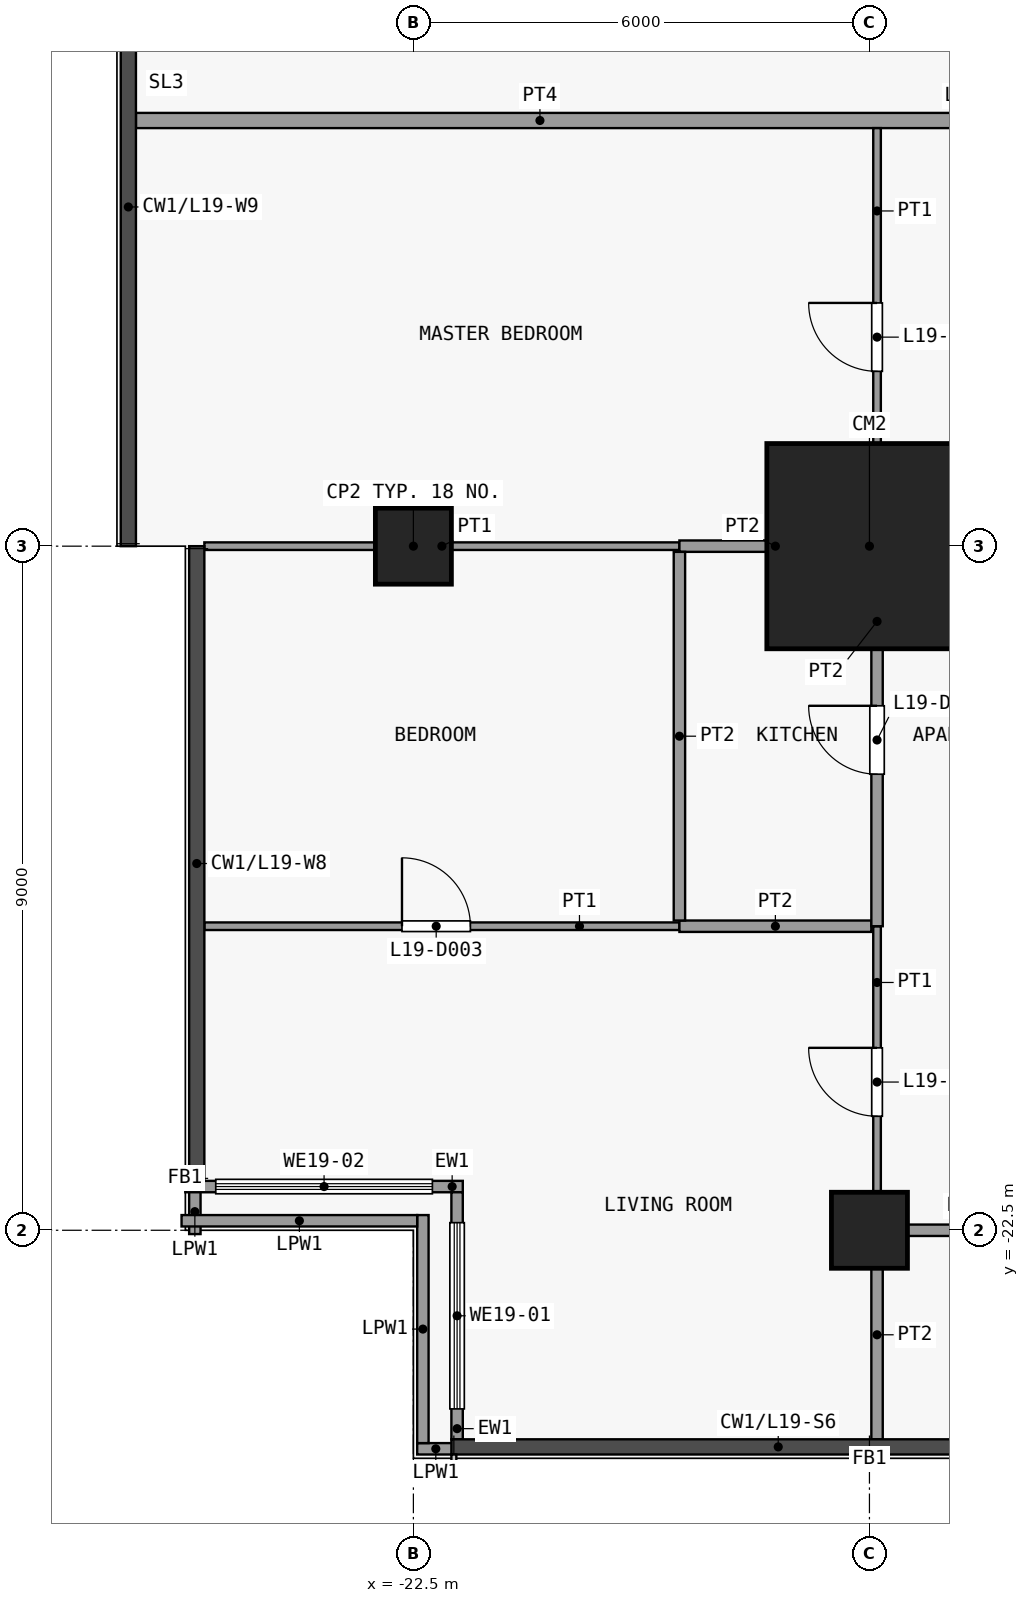
"""IFC4 building model, lengths in metres.
Left out: names, types, materials, properties, quantities, classifications, styles, units other than length and angle.
Written with IfcOpenShell. Run it as: python <this file> out.ifc"""

import sys

from ifc_helpers import new_model, si_unit, direction, frame, frame_2d, origin, origin_2d, place, context, subcontext, project, spatial, rectangle, extrude, element, fill, save


model = new_model("IFC4")
c1 = context("Model", 3, precision=1e-05, world=origin(), true_north=direction((0.0, 1.0)))
c2 = subcontext(c1, "Body", "Model", "MODEL_VIEW")
j1 = project(units=[si_unit("LENGTHUNIT", "METRE"), si_unit("PLANEANGLEUNIT", "RADIAN")], contexts=[c1])
p1 = place(None, origin())
s1 = spatial("IfcSite", under=j1, at=p1, CompositionType="ELEMENT")
p2 = place(p1, origin())
s2 = spatial("IfcBuilding", under=s1, at=p2, CompositionType="ELEMENT")
p3 = place(p2, frame((0.0, 0.0, 81.1)))
s3 = spatial("IfcBuildingStorey", under=s2, at=p3, CompositionType="ELEMENT", Elevation=81.1)
for number, where, z_axis, x_axis in (
    (1, (-22.5, -13.5, 0.0), (0.0, 0.0, 1.0), (1.0, 0.0, 0.0)),
    (2, (-16.5, -22.5, 0.0), (0.0, 0.0, 1.0), (1.0, 0.0, 0.0)),
):
    element("IfcColumn", number, at=place(p3, frame(where, z_axis=z_axis, x_axis=x_axis)), inside=s3, PredefinedType="COLUMN", context=c2, shape_type="SweptSolid", body=[
        extrude(rectangle(XDim=1.0, YDim=1.0, at=origin_2d()), origin(), (0.0, 0.0, 1.0), 3.6),
    ])
p4 = place(p3, frame((-16.5, -13.5, 0.0), z_axis=(0.0, 0.0, 1.0), x_axis=(1.0, 0.0, 0.0)))
e3 = element("IfcColumn", 3, at=p4, inside=s3, PredefinedType="COLUMN", context=c2, shape_type="SweptSolid", body=[
    extrude(rectangle(XDim=2.7, YDim=2.7, at=origin_2d()), origin(), (0.0, 0.0, 1.0), 3.6),
])
p5 = place(p3, frame((-21.925, -25.25, 0.0), z_axis=(0.0, 0.0, 1.0), x_axis=(0.0, 1.0, 0.0)))
e4 = element("IfcWall", 4, at=p5, inside=s3, PredefinedType="SOLIDWALL", context=c2, shape_type="SweptSolid", body=[
    extrude(rectangle(XDim=3.25, YDim=0.15, at=frame_2d((1.625, 0.0))), origin(), (0.0, 0.0, 1.0), 3.3),
])
p6 = place(p5, frame((0.4, 0.0, 0.9)))
e5 = element("IfcOpeningElement", 5, at=p6, cuts=e4, PredefinedType="OPENING", context=c2, shape_type="SweptSolid", body=[
    extrude(rectangle(XDim=2.45, YDim=2.4, at=frame_2d((1.225, 1.2))), frame((0.0, 0.085, 0.0), z_axis=(0.0, -1.0, 0.0), x_axis=(1.0, 0.0, 0.0)), (0.0, 0.0, 1.0), 0.17),
])
p7 = place(p3, frame((-21.85, -21.925, 0.0), z_axis=(0.0, 0.0, 1.0), x_axis=(-1.0, 0.0, 0.0)))
e6 = element("IfcWall", 6, at=p7, inside=s3, PredefinedType="SOLIDWALL", context=c2, shape_type="SweptSolid", body=[
    extrude(rectangle(XDim=3.65, YDim=0.15, at=frame_2d((1.825, 0.0))), origin(), (0.0, 0.0, 1.0), 3.3),
])
p8 = place(p7, frame((0.4, 0.0, 0.9)))
e7 = element("IfcOpeningElement", 7, at=p8, cuts=e6, PredefinedType="OPENING", context=c2, shape_type="SweptSolid", body=[
    extrude(rectangle(XDim=2.85, YDim=2.4, at=frame_2d((1.425, 1.2))), frame((0.0, 0.085, 0.0), z_axis=(0.0, -1.0, 0.0), x_axis=(1.0, 0.0, 0.0)), (0.0, 0.0, 1.0), 0.17),
])
p9 = place(p3, frame((-25.375, -22.55, 0.0), z_axis=(0.0, 0.0, 1.0), x_axis=(0.0, 1.0, 0.0)))
e8 = element("IfcWall", 8, at=p9, inside=s3, PredefinedType="PARAPET", context=c2, shape_type="SweptSolid", body=[
    extrude(rectangle(XDim=0.59, YDim=0.15, at=frame_2d((0.295, 0.0))), origin(), (0.0, 0.0, 1.0), 1.15),
])
p10 = place(p3, frame((-21.96, -25.375, 0.0), z_axis=(0.0, 0.0, 1.0), x_axis=(-1.0, 0.0, 0.0)))
e9 = element("IfcWall", 9, at=p10, inside=s3, PredefinedType="PARAPET", context=c2, shape_type="SweptSolid", body=[
    extrude(rectangle(XDim=0.49, YDim=0.15, at=frame_2d((0.245, 0.0))), origin(), (0.0, 0.0, 1.0), 1.15),
])
p11 = place(p3, frame((-22.375, -25.3, 0.0), z_axis=(0.0, 0.0, 1.0), x_axis=(0.0, 1.0, 0.0)))
e10 = element("IfcWall", 10, at=p11, inside=s3, PredefinedType="PARAPET", context=c2, shape_type="SweptSolid", body=[
    extrude(rectangle(XDim=3.0, YDim=0.15, at=frame_2d((1.5, 0.0))), origin(), (0.0, 0.0, 1.0), 1.15),
])
p12 = place(p3, frame((-22.45, -22.375, 0.0), z_axis=(0.0, 0.0, 1.0), x_axis=(-1.0, 0.0, 0.0)))
e11 = element("IfcWall", 11, at=p12, inside=s3, PredefinedType="PARAPET", context=c2, shape_type="SweptSolid", body=[
    extrude(rectangle(XDim=3.1, YDim=0.15, at=frame_2d((1.55, 0.0))), origin(), (0.0, 0.0, 1.0), 1.15),
])
p13 = place(p3, frame((-16.325, -22.5, 0.0), z_axis=(0.0, 0.0, 1.0), x_axis=(1.0, 0.0, 0.0)))
e12 = element("IfcWall", 12, at=p13, inside=s3, PredefinedType="PARTITIONING", context=c2, shape_type="SweptSolid", body=[
    extrude(rectangle(XDim=2.925, YDim=0.15, at=frame_2d((1.462, 0.0))), origin(), (0.0, 0.0, 1.0), 3.3),
])
p14 = place(p13, frame((1.0, 0.0, 0.0)))
e13 = element("IfcOpeningElement", 13, at=p14, cuts=e12, PredefinedType="OPENING", context=c2, shape_type="SweptSolid", body=[
    extrude(rectangle(XDim=0.9, YDim=2.1, at=frame_2d((0.45, 1.05))), frame((0.0, 0.085, 0.0), z_axis=(0.0, -1.0, 0.0), x_axis=(1.0, 0.0, 0.0)), (0.0, 0.0, 1.0), 0.17),
])
p15 = place(p3, frame((-25.25, -18.5, 0.0), z_axis=(0.0, 0.0, 1.0), x_axis=(1.0, 0.0, 0.0)))
e14 = element("IfcWall", 14, at=p15, inside=s3, PredefinedType="PARTITIONING", context=c2, shape_type="SweptSolid", body=[
    extrude(rectangle(XDim=6.25, YDim=0.1, at=frame_2d((3.125, 0.0))), origin(), (0.0, 0.0, 1.0), 3.3),
])
p16 = place(p15, frame((2.6, 0.0, 0.0)))
e15 = element("IfcOpeningElement", 15, at=p16, cuts=e14, PredefinedType="OPENING", context=c2, shape_type="SweptSolid", body=[
    extrude(rectangle(XDim=0.9, YDim=2.1, at=frame_2d((0.45, 1.05))), frame((0.0, 0.06, 0.0), z_axis=(0.0, -1.0, 0.0), x_axis=(1.0, 0.0, 0.0)), (0.0, 0.0, 1.0), 0.12),
])
p17 = place(p3, frame((-19.0, -18.5, 0.0), z_axis=(0.0, 0.0, 1.0), x_axis=(1.0, 0.0, 0.0)))
e16 = element("IfcWall", 16, at=p17, inside=s3, PredefinedType="PARTITIONING", context=c2, shape_type="SweptSolid", body=[
    extrude(rectangle(XDim=2.525, YDim=0.15, at=frame_2d((1.262, 0.0))), origin(), (0.0, 0.0, 1.0), 3.3),
])
p18 = place(p3, frame((-25.25, -13.5, 0.0), z_axis=(0.0, 0.0, 1.0), x_axis=(1.0, 0.0, 0.0)))
e17 = element("IfcWall", 17, at=p18, inside=s3, PredefinedType="PARTITIONING", context=c2, shape_type="SweptSolid", body=[
    extrude(rectangle(XDim=6.25, YDim=0.1, at=frame_2d((3.125, 0.0))), origin(), (0.0, 0.0, 1.0), 3.3),
])
p19 = place(p3, frame((-19.0, -13.5, 0.0), z_axis=(0.0, 0.0, 1.0), x_axis=(1.0, 0.0, 0.0)))
e18 = element("IfcWall", 18, at=p19, inside=s3, PredefinedType="PARTITIONING", context=c2, shape_type="SweptSolid", body=[
    extrude(rectangle(XDim=2.525, YDim=0.15, at=frame_2d((1.262, 0.0))), origin(), (0.0, 0.0, 1.0), 3.3),
])
p20 = place(p3, frame((-26.15, -7.9, 0.0), z_axis=(0.0, 0.0, 1.0), x_axis=(1.0, 0.0, 0.0)))
e19 = element("IfcWall", 19, at=p20, inside=s3, PredefinedType="PARTITIONING", context=c2, shape_type="SweptSolid", body=[
    extrude(rectangle(XDim=12.75, YDim=0.2, at=frame_2d((6.375, 0.0))), origin(), (0.0, 0.0, 1.0), 3.3),
])
p21 = place(p20, frame((10.75, 0.0, 0.0)))
e20 = element("IfcOpeningElement", 20, at=p21, cuts=e19, PredefinedType="OPENING", context=c2, shape_type="SweptSolid", body=[
    extrude(rectangle(XDim=1.0, YDim=2.1, at=frame_2d((0.5, 1.05))), frame((0.0, 0.11, 0.0), z_axis=(0.0, -1.0, 0.0), x_axis=(1.0, 0.0, 0.0)), (0.0, 0.0, 1.0), 0.22),
])
p22 = place(p3, frame((-19.0, -18.425, 0.0), z_axis=(0.0, 0.0, 1.0), x_axis=(0.0, 1.0, 0.0)))
e21 = element("IfcWall", 21, at=p22, inside=s3, PredefinedType="PARTITIONING", context=c2, shape_type="SweptSolid", body=[
    extrude(rectangle(XDim=4.85, YDim=0.15, at=frame_2d((2.425, 0.0))), origin(), (0.0, 0.0, 1.0), 3.3),
])
p23 = place(p3, frame((-16.4, -22.5, 0.0), z_axis=(0.0, 0.0, 1.0), x_axis=(0.0, 1.0, 0.0)))
e22 = element("IfcWall", 22, at=p23, inside=s3, PredefinedType="PARTITIONING", context=c2, shape_type="SweptSolid", body=[
    extrude(rectangle(XDim=4.0, YDim=0.1, at=frame_2d((2.0, 0.0))), origin(), (0.0, 0.0, 1.0), 3.3),
])
p24 = place(p23, frame((1.5, 0.0, 0.0)))
e23 = element("IfcOpeningElement", 23, at=p24, cuts=e22, PredefinedType="OPENING", context=c2, shape_type="SweptSolid", body=[
    extrude(rectangle(XDim=0.9, YDim=2.1, at=frame_2d((0.45, 1.05))), frame((0.0, 0.06, 0.0), z_axis=(0.0, -1.0, 0.0), x_axis=(1.0, 0.0, 0.0)), (0.0, 0.0, 1.0), 0.12),
])
p25 = place(p3, frame((-16.4, -13.5, 0.0), z_axis=(0.0, 0.0, 1.0), x_axis=(0.0, 1.0, 0.0)))
e24 = element("IfcWall", 24, at=p25, inside=s3, PredefinedType="PARTITIONING", context=c2, shape_type="SweptSolid", body=[
    extrude(rectangle(XDim=5.5, YDim=0.1, at=frame_2d((2.75, 0.0))), origin(), (0.0, 0.0, 1.0), 3.3),
])
p26 = place(p25, frame((2.3, 0.0, 0.0)))
e25 = element("IfcOpeningElement", 25, at=p26, cuts=e24, PredefinedType="OPENING", context=c2, shape_type="SweptSolid", body=[
    extrude(rectangle(XDim=0.9, YDim=2.1, at=frame_2d((0.45, 1.05))), frame((0.0, 0.06, 0.0), z_axis=(0.0, -1.0, 0.0), x_axis=(1.0, 0.0, 0.0)), (0.0, 0.0, 1.0), 0.12),
])
p27 = place(p3, frame((-16.4, -25.25, 0.0), z_axis=(0.0, 0.0, 1.0), x_axis=(0.0, 1.0, 0.0)))
e26 = element("IfcWall", 26, at=p27, inside=s3, PredefinedType="PARTITIONING", context=c2, shape_type="SweptSolid", body=[
    extrude(rectangle(XDim=2.75, YDim=0.15, at=frame_2d((1.375, 0.0))), origin(), (0.0, 0.0, 1.0), 3.3),
])
p28 = place(p3, frame((-16.4, -18.5, 0.0), z_axis=(0.0, 0.0, 1.0), x_axis=(0.0, 1.0, 0.0)))
e27 = element("IfcWall", 27, at=p28, inside=s3, PredefinedType="PARTITIONING", context=c2, shape_type="SweptSolid", body=[
    extrude(rectangle(XDim=5.0, YDim=0.15, at=frame_2d((2.5, 0.0))), origin(), (0.0, 0.0, 1.0), 3.3),
])
p29 = place(p28, frame((2.0, 0.0, 0.0)))
e28 = element("IfcOpeningElement", 28, at=p29, cuts=e27, PredefinedType="OPENING", context=c2, shape_type="SweptSolid", body=[
    extrude(rectangle(XDim=0.9, YDim=2.1, at=frame_2d((0.45, 1.05))), frame((0.0, 0.085, 0.0), z_axis=(0.0, -1.0, 0.0), x_axis=(1.0, 0.0, 0.0)), (0.0, 0.0, 1.0), 0.17),
])
p30 = place(p6, origin())
e29 = element("IfcWindow", 29, at=p30, inside=s3, PartitioningType="SINGLE_PANEL", PredefinedType="WINDOW", context=c2, shape_type="SweptSolid", body=[
    extrude(rectangle(XDim=2.45, YDim=2.4, at=frame_2d((1.225, 1.2))), frame((0.0, 0.03, 0.0), z_axis=(0.0, -1.0, 0.0), x_axis=(1.0, 0.0, 0.0)), (0.0, 0.0, 1.0), 0.06),
])
fill(e5, e29)
p31 = place(p8, origin())
e30 = element("IfcWindow", 30, at=p31, inside=s3, PartitioningType="SINGLE_PANEL", PredefinedType="WINDOW", context=c2, shape_type="SweptSolid", body=[
    extrude(rectangle(XDim=2.85, YDim=2.4, at=frame_2d((1.425, 1.2))), frame((0.0, 0.03, 0.0), z_axis=(0.0, -1.0, 0.0), x_axis=(1.0, 0.0, 0.0)), (0.0, 0.0, 1.0), 0.06),
])
fill(e7, e30)
p32 = place(p16, origin())
e31 = element("IfcDoor", 31, at=p32, inside=s3, OperationType="SINGLE_SWING_RIGHT", PredefinedType="DOOR", context=c2, shape_type="SweptSolid", body=[
    extrude(rectangle(XDim=0.9, YDim=2.1, at=frame_2d((0.45, 1.05))), frame((0.0, 0.025, 0.0), z_axis=(0.0, -1.0, 0.0), x_axis=(1.0, 0.0, 0.0)), (0.0, 0.0, 1.0), 0.05),
])
fill(e15, e31)
p33 = place(p24, origin())
e32 = element("IfcDoor", 32, at=p33, inside=s3, OperationType="SINGLE_SWING_LEFT", PredefinedType="DOOR", context=c2, shape_type="SweptSolid", body=[
    extrude(rectangle(XDim=0.9, YDim=2.1, at=frame_2d((0.45, 1.05))), frame((0.0, 0.025, 0.0), z_axis=(0.0, -1.0, 0.0), x_axis=(1.0, 0.0, 0.0)), (0.0, 0.0, 1.0), 0.05),
])
fill(e23, e32)
p34 = place(p26, origin())
e33 = element("IfcDoor", 33, at=p34, inside=s3, OperationType="SINGLE_SWING_LEFT", PredefinedType="DOOR", context=c2, shape_type="SweptSolid", body=[
    extrude(rectangle(XDim=0.9, YDim=2.1, at=frame_2d((0.45, 1.05))), frame((0.0, 0.025, 0.0), z_axis=(0.0, -1.0, 0.0), x_axis=(1.0, 0.0, 0.0)), (0.0, 0.0, 1.0), 0.05),
])
fill(e25, e33)
p35 = place(p29, origin())
e34 = element("IfcDoor", 34, at=p35, inside=s3, OperationType="SINGLE_SWING_LEFT", PredefinedType="DOOR", context=c2, shape_type="SweptSolid", body=[
    extrude(rectangle(XDim=0.9, YDim=2.1, at=frame_2d((0.45, 1.05))), frame((0.0, 0.025, 0.0), z_axis=(0.0, -1.0, 0.0), x_axis=(1.0, 0.0, 0.0)), (0.0, 0.0, 1.0), 0.05),
])
fill(e28, e34)
save(model, sys.argv[1])
